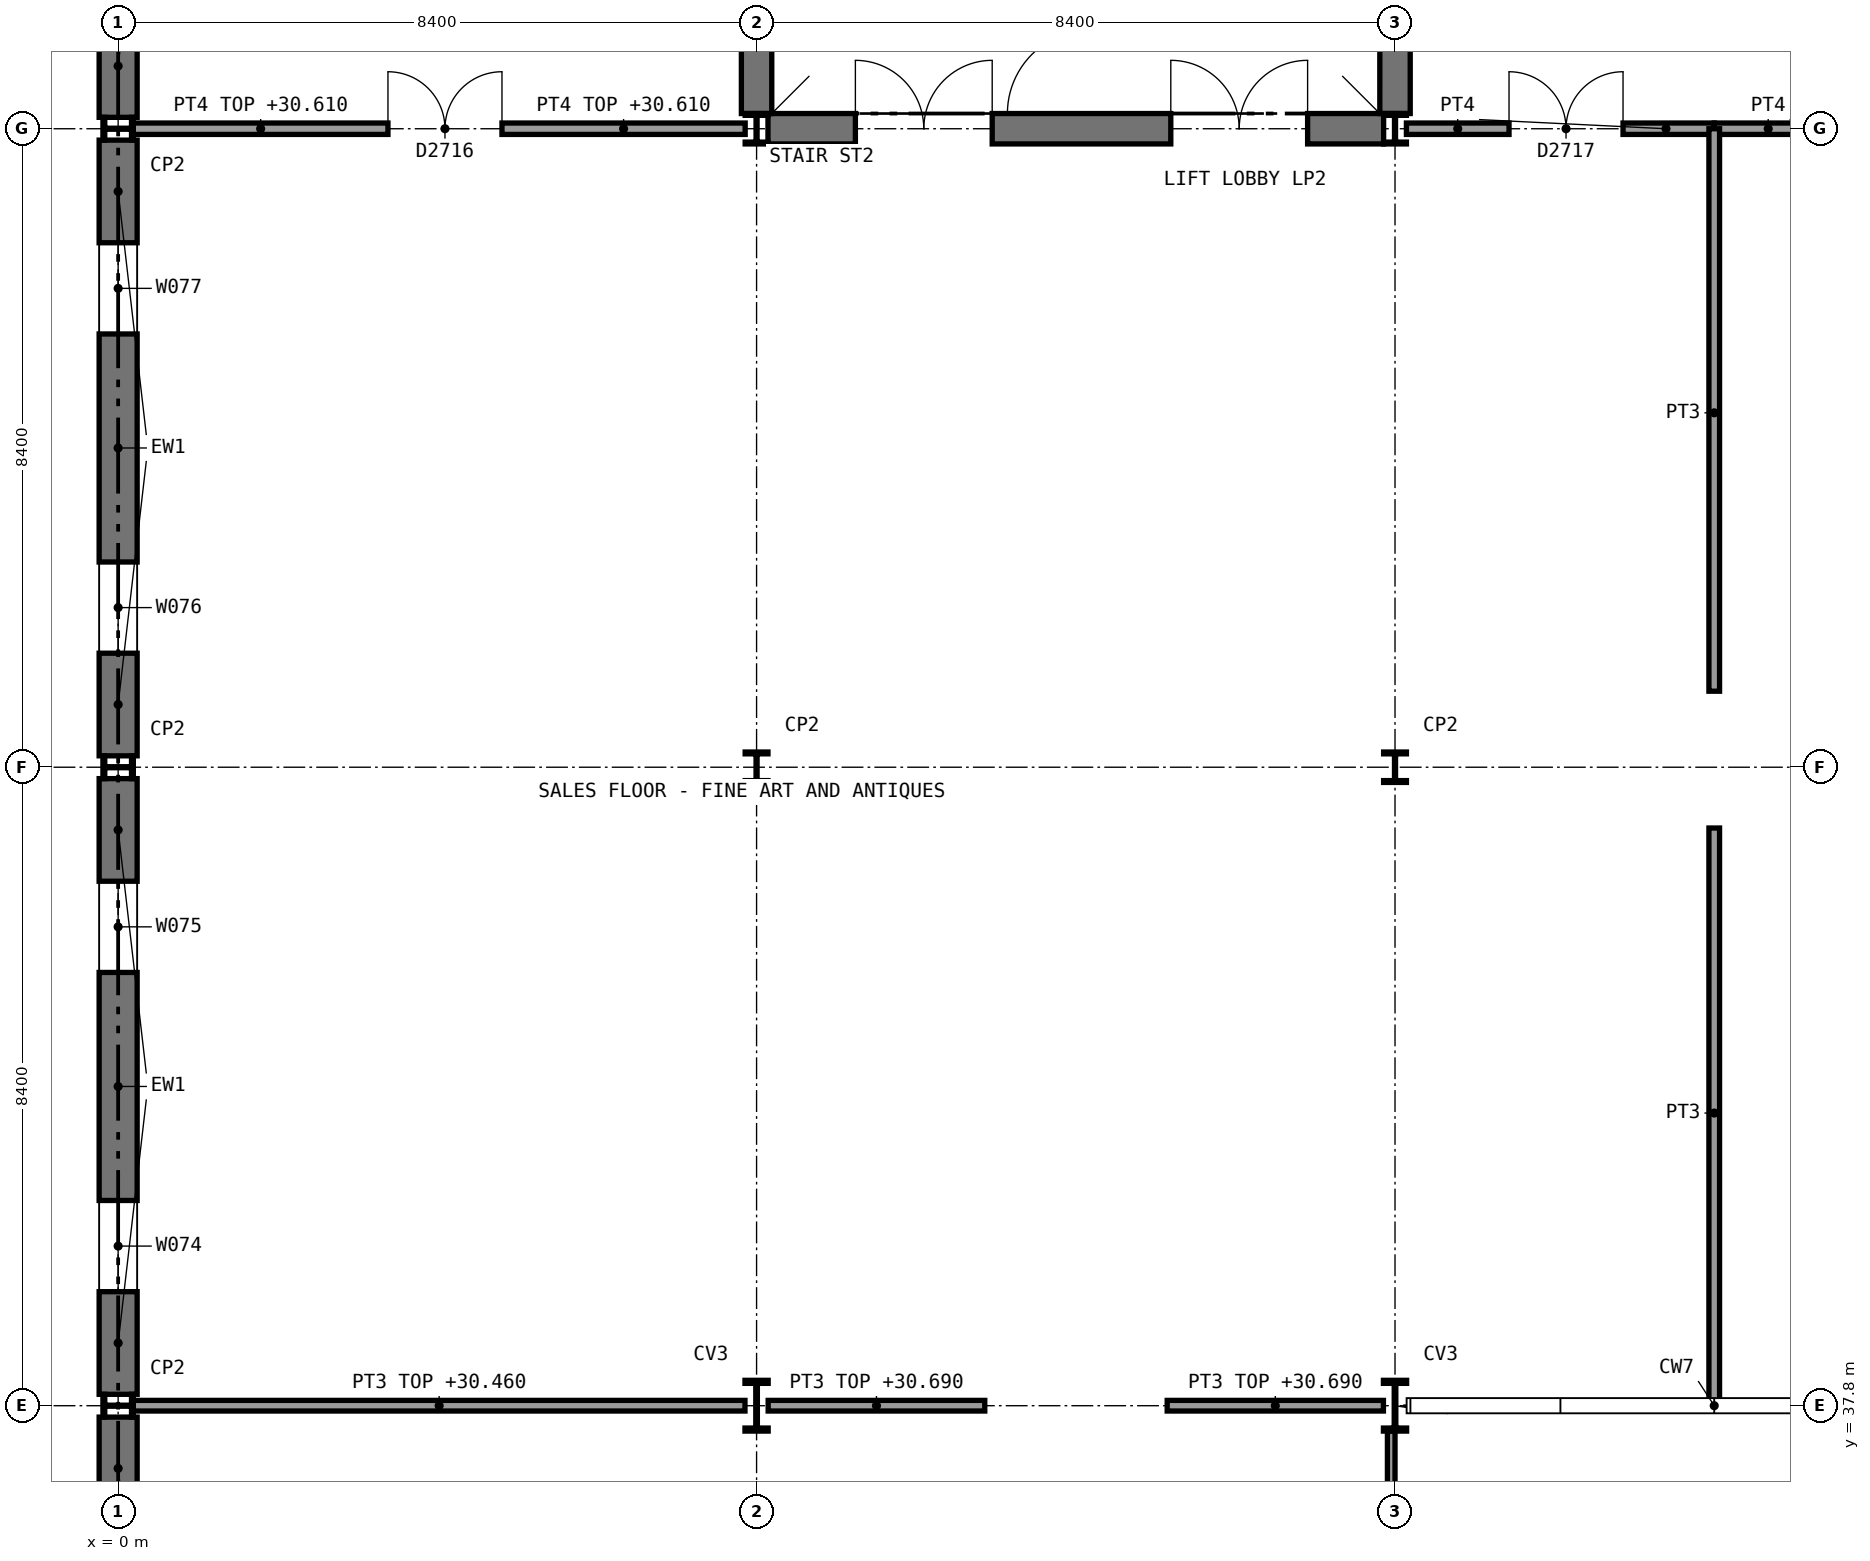
"""IFC4 building model, lengths in metres.
Left out: names, types, materials, properties, quantities, classifications, styles, units other than length and angle.
Written with IfcOpenShell. Run it as: python <this file> out.ifc"""

import sys

from ifc_helpers import new_model, si_unit, direction, frame, frame_2d, origin, origin_2d, place, context, subcontext, project, spatial, rectangle, i_section, extrude, element, fill, save


model = new_model("IFC4")
c1 = context("Model", 3, precision=1e-05, world=origin(), true_north=direction((0.0, 1.0)))
c2 = subcontext(c1, "Body", "Model", "MODEL_VIEW")
j1 = project(units=[si_unit("LENGTHUNIT", "METRE"), si_unit("PLANEANGLEUNIT", "RADIAN")], contexts=[c1])
p1 = place(None, origin())
s1 = spatial("IfcSite", under=j1, at=p1, CompositionType="ELEMENT")
p2 = place(p1, origin())
s2 = spatial("IfcBuilding", under=s1, at=p2, CompositionType="ELEMENT")
p3 = place(p2, frame((0.0, 0.0, 25.8)))
s3 = spatial("IfcBuildingStorey", under=s2, at=p3, CompositionType="ELEMENT", Elevation=25.8)
p4 = place(p3, frame((8.55, 54.6, 0.0), z_axis=(0.0, 0.0, 1.0), x_axis=(1.0, 0.0, 0.0)))
e1 = element("IfcWall", 1, at=p4, inside=s3, PredefinedType="SHEAR", context=c2, shape_type="SweptSolid", body=[
    extrude(rectangle(XDim=8.1, YDim=0.4, at=frame_2d((4.05, 0.0))), origin(), (0.0, 0.0, 1.0), 4.51),
])
p5 = place(p4, frame((1.15, 0.0, 0.0)))
e2 = element("IfcOpeningElement", 2, at=p5, cuts=e1, PredefinedType="OPENING", context=c2, shape_type="SweptSolid", body=[
    extrude(rectangle(XDim=1.8, YDim=2.1, at=frame_2d((0.9, 1.05))), frame((0.0, 0.21, 0.0), z_axis=(0.0, -1.0, 0.0), x_axis=(1.0, 0.0, 0.0)), (0.0, 0.0, 1.0), 0.42),
])
p6 = place(p4, frame((5.3, 0.0, 0.0)))
e3 = element("IfcOpeningElement", 3, at=p6, cuts=e1, PredefinedType="OPENING", context=c2, shape_type="SweptSolid", body=[
    extrude(rectangle(XDim=1.8, YDim=2.1, at=frame_2d((0.9, 1.05))), frame((0.0, 0.21, 0.0), z_axis=(0.0, -1.0, 0.0), x_axis=(1.0, 0.0, 0.0)), (0.0, 0.0, 1.0), 0.42),
])
for number, where, z_axis, x_axis in (
    (4, (8.4, 54.8, 0.0), (0.0, 0.0, 1.0), (0.0, 1.0, 0.0)),
    (5, (16.8, 54.8, 0.0), (0.0, 0.0, 1.0), (0.0, 1.0, 0.0)),
):
    element("IfcWall", number, at=place(p3, frame(where, z_axis=z_axis, x_axis=x_axis)), inside=s3, PredefinedType="SHEAR", context=c2, shape_type="SweptSolid", body=[
        extrude(rectangle(XDim=8.0, YDim=0.4, at=frame_2d((4.0, 0.0))), origin(), (0.0, 0.0, 1.0), 5.2),
    ])
for number, where, z_axis, x_axis in (
    (6, (0.0, 37.8, 0.0), (0.0, 0.0, 1.0), (0.0, 1.0, 0.0)),
    (7, (0.0, 46.2, 0.0), (0.0, 0.0, 1.0), (0.0, 1.0, 0.0)),
    (8, (0.0, 54.6, 0.0), (0.0, 0.0, 1.0), (0.0, 1.0, 0.0)),
):
    element("IfcColumn", number, at=place(p3, frame(where, z_axis=z_axis, x_axis=x_axis)), inside=s3, PredefinedType="COLUMN", context=c2, shape_type="SweptSolid", body=[
        extrude(i_section(OverallWidth=0.3, OverallDepth=0.4, WebThickness=0.013, FlangeThickness=0.024, FilletRadius=0.027, at=origin_2d()), origin(), (0.0, 0.0, 1.0), 5.4),
    ])
p7 = place(p3, frame((8.4, 37.8, 0.0), z_axis=(0.0, 0.0, 1.0), x_axis=(1.0, 0.0, 0.0)))
e9 = element("IfcColumn", 9, at=p7, inside=s3, PredefinedType="COLUMN", context=c2, shape_type="SweptSolid", body=[
    extrude(i_section(OverallWidth=0.305, OverallDepth=0.668, WebThickness=0.021, FlangeThickness=0.04, FilletRadius=0.027, at=origin_2d()), origin(), (0.0, 0.0, 1.0), 5.4),
])
for number, where, z_axis, x_axis in (
    (10, (8.4, 46.2, 0.0), (0.0, 0.0, 1.0), (1.0, 0.0, 0.0)),
    (11, (8.4, 54.6, 0.0), (0.0, 0.0, 1.0), (1.0, 0.0, 0.0)),
):
    element("IfcColumn", number, at=place(p3, frame(where, z_axis=z_axis, x_axis=x_axis)), inside=s3, PredefinedType="COLUMN", context=c2, shape_type="SweptSolid", body=[
        extrude(i_section(OverallWidth=0.3, OverallDepth=0.4, WebThickness=0.013, FlangeThickness=0.024, FilletRadius=0.027, at=origin_2d()), origin(), (0.0, 0.0, 1.0), 5.4),
    ])
p8 = place(p3, frame((16.8, 37.8, 0.0), z_axis=(0.0, 0.0, 1.0), x_axis=(1.0, 0.0, 0.0)))
e12 = element("IfcColumn", 12, at=p8, inside=s3, PredefinedType="COLUMN", context=c2, shape_type="SweptSolid", body=[
    extrude(i_section(OverallWidth=0.305, OverallDepth=0.668, WebThickness=0.021, FlangeThickness=0.04, FilletRadius=0.027, at=origin_2d()), origin(), (0.0, 0.0, 1.0), 5.4),
])
for number, where, z_axis, x_axis in (
    (13, (16.8, 46.2, 0.0), (0.0, 0.0, 1.0), (1.0, 0.0, 0.0)),
    (14, (16.8, 54.6, 0.0), (0.0, 0.0, 1.0), (1.0, 0.0, 0.0)),
):
    element("IfcColumn", number, at=place(p3, frame(where, z_axis=z_axis, x_axis=x_axis)), inside=s3, PredefinedType="COLUMN", context=c2, shape_type="SweptSolid", body=[
        extrude(i_section(OverallWidth=0.3, OverallDepth=0.4, WebThickness=0.013, FlangeThickness=0.024, FilletRadius=0.027, at=origin_2d()), origin(), (0.0, 0.0, 1.0), 5.4),
    ])
p9 = place(p3, frame((0.2, 54.6, 0.0), z_axis=(0.0, 0.0, 1.0), x_axis=(1.0, 0.0, 0.0)))
e15 = element("IfcWall", 15, at=p9, inside=s3, PredefinedType="SOLIDWALL", context=c2, shape_type="SweptSolid", body=[
    extrude(rectangle(XDim=8.05, YDim=0.15, at=frame_2d((4.025, 0.0))), origin(), (0.0, 0.0, 1.0), 4.81),
])
p10 = place(p9, frame((3.35, 0.0, 0.0)))
e16 = element("IfcOpeningElement", 16, at=p10, cuts=e15, PredefinedType="OPENING", context=c2, shape_type="SweptSolid", body=[
    extrude(rectangle(XDim=1.5, YDim=2.1, at=frame_2d((0.75, 1.05))), frame((0.0, 0.085, 0.0), z_axis=(0.0, -1.0, 0.0), x_axis=(1.0, 0.0, 0.0)), (0.0, 0.0, 1.0), 0.17),
])
p11 = place(p3, frame((16.95, 54.6, 0.0), z_axis=(0.0, 0.0, 1.0), x_axis=(1.0, 0.0, 0.0)))
e17 = element("IfcWall", 17, at=p11, inside=s3, PredefinedType="SOLIDWALL", context=c2, shape_type="SweptSolid", body=[
    extrude(rectangle(XDim=4.05, YDim=0.15, at=frame_2d((2.025, 0.0))), origin(), (0.0, 0.0, 1.0), 4.89),
])
p12 = place(p11, frame((1.35, 0.0, 0.0)))
e18 = element("IfcOpeningElement", 18, at=p12, cuts=e17, PredefinedType="OPENING", context=c2, shape_type="SweptSolid", body=[
    extrude(rectangle(XDim=1.5, YDim=2.1, at=frame_2d((0.75, 1.05))), frame((0.0, 0.085, 0.0), z_axis=(0.0, -1.0, 0.0), x_axis=(1.0, 0.0, 0.0)), (0.0, 0.0, 1.0), 0.17),
])
p13 = place(p3, frame((21.0, 54.6, 0.0), z_axis=(0.0, 0.0, 1.0), x_axis=(1.0, 0.0, 0.0)))
e19 = element("IfcWall", 19, at=p13, inside=s3, PredefinedType="SOLIDWALL", context=c2, shape_type="SweptSolid", body=[
    extrude(rectangle(XDim=4.05, YDim=0.15, at=frame_2d((2.025, 0.0))), origin(), (0.0, 0.0, 1.0), 4.89),
])
p14 = place(p13, frame((1.35, 0.0, 0.0)))
e20 = element("IfcOpeningElement", 20, at=p14, cuts=e19, PredefinedType="OPENING", context=c2, shape_type="SweptSolid", body=[
    extrude(rectangle(XDim=1.5, YDim=2.1, at=frame_2d((0.75, 1.05))), frame((0.0, 0.085, 0.0), z_axis=(0.0, -1.0, 0.0), x_axis=(1.0, 0.0, 0.0)), (0.0, 0.0, 1.0), 0.17),
])
p15 = place(p3, frame((21.0, 37.8, 0.0), z_axis=(0.0, 0.0, 1.0), x_axis=(0.0, 1.0, 0.0)))
e21 = element("IfcWall", 21, at=p15, inside=s3, PredefinedType="PARTITIONING", context=c2, shape_type="SweptSolid", body=[
    extrude(rectangle(XDim=7.6, YDim=0.14, at=frame_2d((3.8, 0.0))), origin(), (0.0, 0.0, 1.0), 5.2),
])
p16 = place(p3, frame((21.0, 47.2, 0.0), z_axis=(0.0, 0.0, 1.0), x_axis=(0.0, 1.0, 0.0)))
e22 = element("IfcWall", 22, at=p16, inside=s3, PredefinedType="PARTITIONING", context=c2, shape_type="SweptSolid", body=[
    extrude(rectangle(XDim=7.4, YDim=0.14, at=frame_2d((3.7, 0.0))), origin(), (0.0, 0.0, 1.0), 5.2),
])
p17 = place(p3, frame((0.2, 37.8, 0.0), z_axis=(0.0, 0.0, 1.0), x_axis=(1.0, 0.0, 0.0)))
e23 = element("IfcWall", 23, at=p17, inside=s3, PredefinedType="PARTITIONING", context=c2, shape_type="SweptSolid", body=[
    extrude(rectangle(XDim=8.047, YDim=0.14, at=frame_2d((4.024, 0.0))), origin(), (0.0, 0.0, 1.0), 4.66),
])
p18 = place(p3, frame((8.552, 37.8, 0.0), z_axis=(0.0, 0.0, 1.0), x_axis=(1.0, 0.0, 0.0)))
e24 = element("IfcWall", 24, at=p18, inside=s3, PredefinedType="PARTITIONING", context=c2, shape_type="SweptSolid", body=[
    extrude(rectangle(XDim=2.85, YDim=0.14, at=frame_2d((1.425, 0.0))), origin(), (0.0, 0.0, 1.0), 4.89),
])
p19 = place(p3, frame((13.802, 37.8, 0.0), z_axis=(0.0, 0.0, 1.0), x_axis=(1.0, 0.0, 0.0)))
e25 = element("IfcWall", 25, at=p19, inside=s3, PredefinedType="PARTITIONING", context=c2, shape_type="SweptSolid", body=[
    extrude(rectangle(XDim=2.845, YDim=0.14, at=frame_2d((1.422, 0.0))), origin(), (0.0, 0.0, 1.0), 4.89),
])
p20 = place(p3, frame((0.0, 25.35, 0.0), z_axis=(0.0, 0.0, 1.0), x_axis=(0.0, 1.0, 0.0)))
e26 = element("IfcWall", 26, at=p20, inside=s3, PredefinedType="STANDARD", context=c2, shape_type="SweptSolid", body=[
    extrude(rectangle(XDim=12.3, YDim=0.5, at=frame_2d((6.15, 0.0))), origin(), (0.0, 0.0, 1.0), 5.2),
])
p21 = place(p20, frame((1.35, 0.0, 2.7)))
e27 = element("IfcOpeningElement", 27, at=p21, cuts=e26, PredefinedType="OPENING", context=c2, shape_type="SweptSolid", body=[
    extrude(rectangle(XDim=1.2, YDim=1.2, at=frame_2d((0.6, 0.6))), frame((0.0, 0.26, 0.0), z_axis=(0.0, -1.0, 0.0), x_axis=(1.0, 0.0, 0.0)), (0.0, 0.0, 1.0), 0.52),
])
p22 = place(p20, frame((5.55, 0.0, 2.7)))
e28 = element("IfcOpeningElement", 28, at=p22, cuts=e26, PredefinedType="OPENING", context=c2, shape_type="SweptSolid", body=[
    extrude(rectangle(XDim=1.2, YDim=1.2, at=frame_2d((0.6, 0.6))), frame((0.0, 0.26, 0.0), z_axis=(0.0, -1.0, 0.0), x_axis=(1.0, 0.0, 0.0)), (0.0, 0.0, 1.0), 0.52),
])
p23 = place(p20, frame((9.75, 0.0, 2.7)))
e29 = element("IfcOpeningElement", 29, at=p23, cuts=e26, PredefinedType="OPENING", context=c2, shape_type="SweptSolid", body=[
    extrude(rectangle(XDim=1.2, YDim=1.2, at=frame_2d((0.6, 0.6))), frame((0.0, 0.26, 0.0), z_axis=(0.0, -1.0, 0.0), x_axis=(1.0, 0.0, 0.0)), (0.0, 0.0, 1.0), 0.52),
])
p24 = place(p3, frame((0.0, 37.95, 0.0), z_axis=(0.0, 0.0, 1.0), x_axis=(0.0, 1.0, 0.0)))
e30 = element("IfcWall", 30, at=p24, inside=s3, PredefinedType="STANDARD", context=c2, shape_type="SweptSolid", body=[
    extrude(rectangle(XDim=8.1, YDim=0.5, at=frame_2d((4.05, 0.0))), origin(), (0.0, 0.0, 1.0), 5.2),
])
p25 = place(p24, frame((1.35, 0.0, 2.7)))
e31 = element("IfcOpeningElement", 31, at=p25, cuts=e30, PredefinedType="OPENING", context=c2, shape_type="SweptSolid", body=[
    extrude(rectangle(XDim=1.2, YDim=1.2, at=frame_2d((0.6, 0.6))), frame((0.0, 0.26, 0.0), z_axis=(0.0, -1.0, 0.0), x_axis=(1.0, 0.0, 0.0)), (0.0, 0.0, 1.0), 0.52),
])
p26 = place(p24, frame((5.55, 0.0, 2.7)))
e32 = element("IfcOpeningElement", 32, at=p26, cuts=e30, PredefinedType="OPENING", context=c2, shape_type="SweptSolid", body=[
    extrude(rectangle(XDim=1.2, YDim=1.2, at=frame_2d((0.6, 0.6))), frame((0.0, 0.26, 0.0), z_axis=(0.0, -1.0, 0.0), x_axis=(1.0, 0.0, 0.0)), (0.0, 0.0, 1.0), 0.52),
])
p27 = place(p3, frame((0.0, 46.35, 0.0), z_axis=(0.0, 0.0, 1.0), x_axis=(0.0, 1.0, 0.0)))
e33 = element("IfcWall", 33, at=p27, inside=s3, PredefinedType="STANDARD", context=c2, shape_type="SweptSolid", body=[
    extrude(rectangle(XDim=8.1, YDim=0.5, at=frame_2d((4.05, 0.0))), origin(), (0.0, 0.0, 1.0), 5.2),
])
p28 = place(p27, frame((1.35, 0.0, 2.7)))
e34 = element("IfcOpeningElement", 34, at=p28, cuts=e33, PredefinedType="OPENING", context=c2, shape_type="SweptSolid", body=[
    extrude(rectangle(XDim=1.2, YDim=1.2, at=frame_2d((0.6, 0.6))), frame((0.0, 0.26, 0.0), z_axis=(0.0, -1.0, 0.0), x_axis=(1.0, 0.0, 0.0)), (0.0, 0.0, 1.0), 0.52),
])
p29 = place(p27, frame((5.55, 0.0, 2.7)))
e35 = element("IfcOpeningElement", 35, at=p29, cuts=e33, PredefinedType="OPENING", context=c2, shape_type="SweptSolid", body=[
    extrude(rectangle(XDim=1.2, YDim=1.2, at=frame_2d((0.6, 0.6))), frame((0.0, 0.26, 0.0), z_axis=(0.0, -1.0, 0.0), x_axis=(1.0, 0.0, 0.0)), (0.0, 0.0, 1.0), 0.52),
])
p30 = place(p3, frame((0.0, 54.75, 0.0), z_axis=(0.0, 0.0, 1.0), x_axis=(0.0, 1.0, 0.0)))
e36 = element("IfcWall", 36, at=p30, inside=s3, PredefinedType="STANDARD", context=c2, shape_type="SweptSolid", body=[
    extrude(rectangle(XDim=8.1, YDim=0.5, at=frame_2d((4.05, 0.0))), origin(), (0.0, 0.0, 1.0), 5.2),
])
p31 = place(p30, frame((1.35, 0.0, 2.7)))
e37 = element("IfcOpeningElement", 37, at=p31, cuts=e36, PredefinedType="OPENING", context=c2, shape_type="SweptSolid", body=[
    extrude(rectangle(XDim=1.2, YDim=1.2, at=frame_2d((0.6, 0.6))), frame((0.0, 0.26, 0.0), z_axis=(0.0, -1.0, 0.0), x_axis=(1.0, 0.0, 0.0)), (0.0, 0.0, 1.0), 0.52),
])
p32 = place(p30, frame((5.55, 0.0, 2.7)))
e38 = element("IfcOpeningElement", 38, at=p32, cuts=e36, PredefinedType="OPENING", context=c2, shape_type="SweptSolid", body=[
    extrude(rectangle(XDim=1.2, YDim=1.2, at=frame_2d((0.6, 0.6))), frame((0.0, 0.26, 0.0), z_axis=(0.0, -1.0, 0.0), x_axis=(1.0, 0.0, 0.0)), (0.0, 0.0, 1.0), 0.52),
])
p33 = place(p3, frame((12.8, 62.8, 0.0), z_axis=(0.0, 0.0, 1.0), x_axis=(0.0, -1.0, 0.0)))
e39 = element("IfcWall", 39, at=p33, inside=s3, PredefinedType="SHEAR", context=c2, shape_type="SweptSolid", body=[
    extrude(rectangle(XDim=8.0, YDim=0.2, at=frame_2d((4.0, 0.0))), origin(), (0.0, 0.0, 1.0), 5.2),
])
p34 = place(p33, frame((6.9, 0.0, 0.0)))
e40 = element("IfcOpeningElement", 40, at=p34, cuts=e39, PredefinedType="OPENING", context=c2, shape_type="SweptSolid", body=[
    extrude(rectangle(XDim=1.11, YDim=2.1, at=frame_2d((0.555, 1.05))), frame((0.0, 0.11, 0.0), z_axis=(0.0, -1.0, 0.0), x_axis=(1.0, 0.0, 0.0)), (0.0, 0.0, 1.0), 0.22),
])
p35 = place(p3, frame((16.75, 25.534, 0.0), z_axis=(0.0, 0.0, 1.0), x_axis=(0.0, 1.0, 0.0)))
e41 = element("IfcWall", 41, at=p35, inside=s3, PredefinedType="PARTITIONING", context=c2, shape_type="SweptSolid", body=[
    extrude(rectangle(XDim=11.932, YDim=0.1, at=frame_2d((5.966, 0.0))), origin(), (0.0, 0.0, 1.0), 4.51),
])
p36 = place(p10, origin())
e42 = element("IfcDoor", 42, at=p36, inside=s3, OperationType="DOUBLE_DOOR_SINGLE_SWING", PredefinedType="DOOR", context=c2, shape_type="SweptSolid", body=[
    extrude(rectangle(XDim=1.5, YDim=2.1, at=frame_2d((0.75, 1.05))), frame((0.0, 0.025, 0.0), z_axis=(0.0, -1.0, 0.0), x_axis=(1.0, 0.0, 0.0)), (0.0, 0.0, 1.0), 0.05),
])
fill(e16, e42)
p37 = place(p12, origin())
e43 = element("IfcDoor", 43, at=p37, inside=s3, OperationType="DOUBLE_DOOR_SINGLE_SWING", PredefinedType="DOOR", context=c2, shape_type="SweptSolid", body=[
    extrude(rectangle(XDim=1.5, YDim=2.1, at=frame_2d((0.75, 1.05))), frame((0.0, 0.025, 0.0), z_axis=(0.0, -1.0, 0.0), x_axis=(1.0, 0.0, 0.0)), (0.0, 0.0, 1.0), 0.05),
])
fill(e18, e43)
p38 = place(p25, origin())
e44 = element("IfcWindow", 44, at=p38, inside=s3, PartitioningType="SINGLE_PANEL", PredefinedType="WINDOW", context=c2, shape_type="SweptSolid", body=[
    extrude(rectangle(XDim=1.2, YDim=1.2, at=frame_2d((0.6, 0.6))), frame((0.0, 0.03, 0.0), z_axis=(0.0, -1.0, 0.0), x_axis=(1.0, 0.0, 0.0)), (0.0, 0.0, 1.0), 0.06),
])
fill(e31, e44)
p39 = place(p26, origin())
e45 = element("IfcWindow", 45, at=p39, inside=s3, PartitioningType="SINGLE_PANEL", PredefinedType="WINDOW", context=c2, shape_type="SweptSolid", body=[
    extrude(rectangle(XDim=1.2, YDim=1.2, at=frame_2d((0.6, 0.6))), frame((0.0, 0.03, 0.0), z_axis=(0.0, -1.0, 0.0), x_axis=(1.0, 0.0, 0.0)), (0.0, 0.0, 1.0), 0.06),
])
fill(e32, e45)
p40 = place(p28, origin())
e46 = element("IfcWindow", 46, at=p40, inside=s3, PartitioningType="SINGLE_PANEL", PredefinedType="WINDOW", context=c2, shape_type="SweptSolid", body=[
    extrude(rectangle(XDim=1.2, YDim=1.2, at=frame_2d((0.6, 0.6))), frame((0.0, 0.03, 0.0), z_axis=(0.0, -1.0, 0.0), x_axis=(1.0, 0.0, 0.0)), (0.0, 0.0, 1.0), 0.06),
])
fill(e34, e46)
p41 = place(p29, origin())
e47 = element("IfcWindow", 47, at=p41, inside=s3, PartitioningType="SINGLE_PANEL", PredefinedType="WINDOW", context=c2, shape_type="SweptSolid", body=[
    extrude(rectangle(XDim=1.2, YDim=1.2, at=frame_2d((0.6, 0.6))), frame((0.0, 0.03, 0.0), z_axis=(0.0, -1.0, 0.0), x_axis=(1.0, 0.0, 0.0)), (0.0, 0.0, 1.0), 0.06),
])
fill(e35, e47)
p42 = place(p34, frame((1.1, 0.0, 0.0), z_axis=(0.0, 0.0, 1.0), x_axis=(-1.0, 0.0, 0.0)))
e48 = element("IfcDoor", 48, at=p42, inside=s3, OperationType="SINGLE_SWING_LEFT", PredefinedType="DOOR", context=c2, shape_type="SweptSolid", body=[
    extrude(rectangle(XDim=1.1, YDim=2.1, at=frame_2d((0.55, 1.05))), frame((0.0, 0.025, 0.0), z_axis=(0.0, -1.0, 0.0), x_axis=(1.0, 0.0, 0.0)), (0.0, 0.0, 1.0), 0.05),
])
fill(e40, e48)
p43 = place(p5, origin())
e49 = element("IfcDoor", 49, at=p43, inside=s3, OperationType="DOUBLE_DOOR_SINGLE_SWING", PredefinedType="DOOR", context=c2, shape_type="SweptSolid", body=[
    extrude(rectangle(XDim=1.8, YDim=2.1, at=frame_2d((0.9, 1.05))), frame((0.0, 0.025, 0.0), z_axis=(0.0, -1.0, 0.0), x_axis=(1.0, 0.0, 0.0)), (0.0, 0.0, 1.0), 0.05),
])
fill(e2, e49)
p44 = place(p6, origin())
e50 = element("IfcDoor", 50, at=p44, inside=s3, OperationType="DOUBLE_DOOR_SINGLE_SWING", PredefinedType="DOOR", context=c2, shape_type="SweptSolid", body=[
    extrude(rectangle(XDim=1.8, YDim=2.1, at=frame_2d((0.9, 1.05))), frame((0.0, 0.025, 0.0), z_axis=(0.0, -1.0, 0.0), x_axis=(1.0, 0.0, 0.0)), (0.0, 0.0, 1.0), 0.05),
])
fill(e3, e50)
save(model, sys.argv[1])
